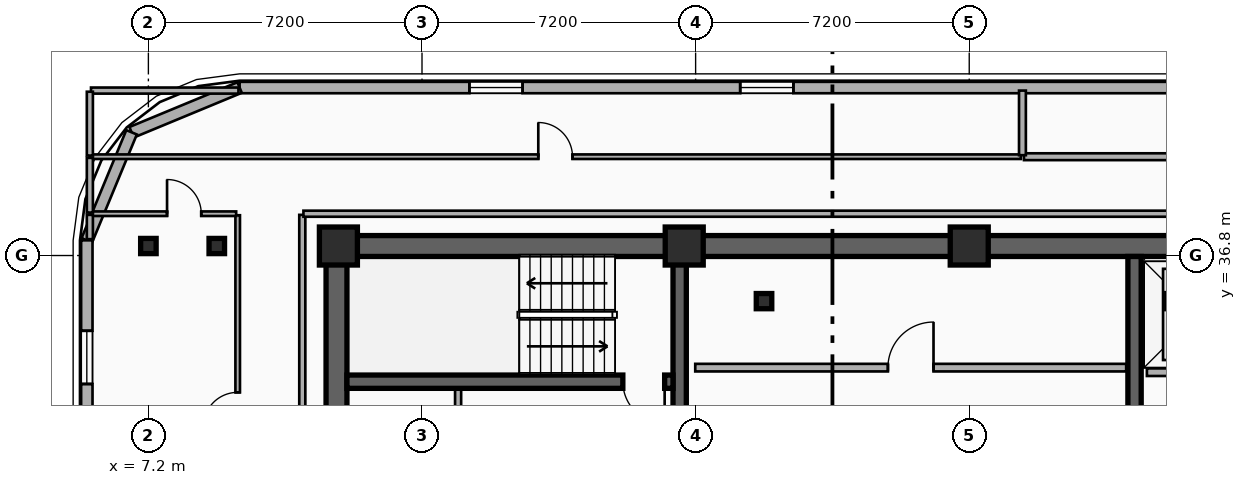
"""IFC4 building model, lengths in metres.
Left out: names, types, materials, properties, quantities, classifications, styles, units other than length and angle.
Written with IfcOpenShell. Run it as: python <this file> out.ifc"""

import sys

from ifc_helpers import new_model, si_unit, direction, frame, frame_2d, origin, origin_2d, place, context, subcontext, project, spatial, rectangle, i_section, extrude, element, fill, save


model = new_model("IFC4")
c1 = context("Model", 3, precision=1e-05, world=origin(), true_north=direction((0.0, 1.0)))
c2 = subcontext(c1, "Body", "Model", "MODEL_VIEW")
j1 = project(units=[si_unit("LENGTHUNIT", "METRE"), si_unit("PLANEANGLEUNIT", "RADIAN")], contexts=[c1])
p1 = place(None, origin())
s1 = spatial("IfcSite", under=j1, at=p1, CompositionType="ELEMENT")
p2 = place(p1, origin())
s2 = spatial("IfcBuilding", under=s1, at=p2, CompositionType="ELEMENT")
p3 = place(p2, frame((0.0, 0.0, 193.2)))
s3 = spatial("IfcBuildingStorey", under=s2, at=p3, CompositionType="ELEMENT", Elevation=193.2)
p4 = place(p3, frame((12.15, 37.05, 0.0), z_axis=(0.0, 0.0, 1.0), x_axis=(1.0, 0.0, 0.0)))
e1 = element("IfcWall", 1, at=p4, inside=s3, PredefinedType="SHEAR", context=c2, shape_type="SweptSolid", body=[
    extrude(rectangle(XDim=33.23, YDim=0.55, at=frame_2d((16.615, 0.0))), origin(), (0.0, 0.0, 1.0), 3.6),
])
p5 = place(p3, frame((12.15, 28.095, 0.0), z_axis=(0.0, 0.0, 1.0), x_axis=(0.0, 1.0, 0.0)))
e2 = element("IfcWall", 2, at=p5, inside=s3, PredefinedType="SHEAR", context=c2, shape_type="SweptSolid", body=[
    extrude(rectangle(XDim=8.68, YDim=0.55, at=frame_2d((4.34, 0.0))), origin(), (0.0, 0.0, 1.0), 3.6),
])
for number, where, z_axis, x_axis in (
    (3, (21.18, 28.095, 0.0), (0.0, 0.0, 1.0), (0.0, 1.0, 0.0)),
    (4, (33.15, 28.095, 0.0), (0.0, 0.0, 1.0), (0.0, 1.0, 0.0)),
):
    element("IfcWall", number, at=place(p3, frame(where, z_axis=z_axis, x_axis=x_axis)), inside=s3, PredefinedType="SHEAR", context=c2, shape_type="SweptSolid", body=[
        extrude(rectangle(XDim=8.68, YDim=0.35, at=frame_2d((4.34, 0.0))), origin(), (0.0, 0.0, 1.0), 3.6),
    ])
p6 = place(p3, frame((21.005, 33.48, 0.0), z_axis=(0.0, 0.0, 1.0), x_axis=(-1.0, 0.0, 0.0)))
e5 = element("IfcWall", 5, at=p6, inside=s3, PredefinedType="SHEAR", context=c2, shape_type="SweptSolid", body=[
    extrude(rectangle(XDim=8.58, YDim=0.35, at=frame_2d((4.29, 0.0))), origin(), (0.0, 0.0, 1.0), 3.6),
])
p7 = place(p6, frame((0.22, 0.0, 0.0)))
e6 = element("IfcOpeningElement", 6, at=p7, cuts=e5, PredefinedType="OPENING", context=c2, shape_type="SweptSolid", body=[
    extrude(rectangle(XDim=1.1, YDim=2.15, at=frame_2d((0.55, 1.075))), frame((0.0, 0.185, 0.0), z_axis=(0.0, -1.0, 0.0), x_axis=(1.0, 0.0, 0.0)), (0.0, 0.0, 1.0), 0.37),
])
p8 = place(p3, frame((23.4, 35.6, 0.0), z_axis=(0.0, 0.0, 1.0), x_axis=(1.0, 0.0, 0.0)))
e7 = element("IfcColumn", 7, at=p8, inside=s3, PredefinedType="COLUMN", context=c2, shape_type="SweptSolid", body=[
    extrude(i_section(OverallWidth=0.408, OverallDepth=0.4, WebThickness=0.025, FlangeThickness=0.039, FilletRadius=0.015, at=origin_2d()), origin(), (0.0, 0.0, 1.0), 3.6),
])
for number, where, z_axis, x_axis in (
    (8, (12.2, 37.05, 0.0), (0.0, 0.0, 1.0), (1.0, 0.0, 0.0)),
    (9, (21.3, 37.05, 0.0), (0.0, 0.0, 1.0), (1.0, 0.0, 0.0)),
    (10, (28.8, 37.05, 0.0), (0.0, 0.0, 1.0), (1.0, 0.0, 0.0)),
):
    element("IfcColumn", number, at=place(p3, frame(where, z_axis=z_axis, x_axis=x_axis)), inside=s3, PredefinedType="COLUMN", context=c2, shape_type="SweptSolid", body=[
        extrude(rectangle(XDim=1.0, YDim=1.0, at=origin_2d()), origin(), (0.0, 0.0, 1.0), 3.6),
    ])
for number, where, z_axis, x_axis in (
    (11, (9.0, 37.05, 0.0), (0.0, 0.0, 1.0), (1.0, 0.0, 0.0)),
    (12, (7.2, 37.05, 0.0), (0.0, 0.0, 1.0), (1.0, 0.0, 0.0)),
):
    element("IfcColumn", number, at=place(p3, frame(where, z_axis=z_axis, x_axis=x_axis)), inside=s3, PredefinedType="COLUMN", context=c2, shape_type="SweptSolid", body=[
        extrude(i_section(OverallWidth=0.408, OverallDepth=0.4, WebThickness=0.025, FlangeThickness=0.039, FilletRadius=0.015, at=origin_2d()), origin(), (0.0, 0.0, 1.0), 3.6),
    ])
p9 = place(p3, frame((9.6, 41.22, 0.0), z_axis=(0.0, 0.0, 1.0), x_axis=(1.0, 0.0, 0.0)))
e13 = element("IfcWall", 13, at=p9, inside=s3, PredefinedType="SOLIDWALL", context=c2, shape_type="SweptSolid", body=[
    extrude(rectangle(XDim=38.4, YDim=0.3, at=frame_2d((19.2, 0.0))), origin(), (0.0, 0.0, 1.0), 3.34),
])
p10 = place(p9, frame((6.047, 0.0, 0.75)))
e14 = element("IfcOpeningElement", 14, at=p10, cuts=e13, PredefinedType="OPENING", context=c2, shape_type="SweptSolid", body=[
    extrude(rectangle(XDim=1.4, YDim=2.1, at=frame_2d((0.7, 1.05))), frame((0.0, 0.16, 0.0), z_axis=(0.0, -1.0, 0.0), x_axis=(1.0, 0.0, 0.0)), (0.0, 0.0, 1.0), 0.32),
])
p11 = place(p9, frame((13.173, 0.0, 0.75)))
e15 = element("IfcOpeningElement", 15, at=p11, cuts=e13, PredefinedType="OPENING", context=c2, shape_type="SweptSolid", body=[
    extrude(rectangle(XDim=1.4, YDim=2.1, at=frame_2d((0.7, 1.05))), frame((0.0, 0.16, 0.0), z_axis=(0.0, -1.0, 0.0), x_axis=(1.0, 0.0, 0.0)), (0.0, 0.0, 1.0), 0.32),
])
p12 = place(p9, frame((25.693, 0.0, 0.75)))
e16 = element("IfcOpeningElement", 16, at=p12, cuts=e13, PredefinedType="OPENING", context=c2, shape_type="SweptSolid", body=[
    extrude(rectangle(XDim=1.4, YDim=2.1, at=frame_2d((0.7, 1.05))), frame((0.0, 0.16, 0.0), z_axis=(0.0, -1.0, 0.0), x_axis=(1.0, 0.0, 0.0)), (0.0, 0.0, 1.0), 0.32),
])
p13 = place(p9, frame((31.887, 0.0, 0.75)))
e17 = element("IfcOpeningElement", 17, at=p13, cuts=e13, PredefinedType="OPENING", context=c2, shape_type="SweptSolid", body=[
    extrude(rectangle(XDim=1.4, YDim=2.1, at=frame_2d((0.7, 1.05))), frame((0.0, 0.16, 0.0), z_axis=(0.0, -1.0, 0.0), x_axis=(1.0, 0.0, 0.0)), (0.0, 0.0, 1.0), 0.32),
])
p14 = place(p3, frame((6.757, 40.042, 0.0), z_axis=(0.0, 0.0, 1.0), x_axis=(0.923882414032, 0.382676475685, 0.0)))
e18 = element("IfcWall", 18, at=p14, inside=s3, PredefinedType="SOLIDWALL", context=c2, shape_type="SweptSolid", body=[
    extrude(rectangle(XDim=3.077, YDim=0.3, at=frame_2d((1.539, 0.0))), origin(), (0.0, 0.0, 1.0), 3.34),
])
p15 = place(p3, frame((5.58, 37.2, 0.0), z_axis=(0.0, 0.0, 1.0), x_axis=(0.382636798336, 0.92389884758, 0.0)))
e19 = element("IfcWall", 19, at=p15, inside=s3, PredefinedType="SOLIDWALL", context=c2, shape_type="SweptSolid", body=[
    extrude(rectangle(XDim=3.077, YDim=0.3, at=frame_2d((1.538, 0.0))), origin(), (0.0, 0.0, 1.0), 3.34),
])
p16 = place(p3, frame((5.58, 8.6, 0.0), z_axis=(0.0, 0.0, 1.0), x_axis=(0.0, 1.0, 0.0)))
e20 = element("IfcWall", 20, at=p16, inside=s3, PredefinedType="SOLIDWALL", context=c2, shape_type="SweptSolid", body=[
    extrude(rectangle(XDim=28.6, YDim=0.3, at=frame_2d((14.3, 0.0))), origin(), (0.0, 0.0, 1.0), 3.34),
])
p17 = place(p16, frame((21.36, 0.0, 0.34)))
e21 = element("IfcOpeningElement", 21, at=p17, cuts=e20, PredefinedType="OPENING", context=c2, shape_type="SweptSolid", body=[
    extrude(rectangle(XDim=1.4, YDim=2.1, at=frame_2d((0.7, 1.05))), frame((0.0, 0.16, 0.0), z_axis=(0.0, -1.0, 0.0), x_axis=(1.0, 0.0, 0.0)), (0.0, 0.0, 1.0), 0.32),
])
p18 = place(p16, frame((24.82, 0.0, 0.34)))
e22 = element("IfcOpeningElement", 22, at=p18, cuts=e20, PredefinedType="OPENING", context=c2, shape_type="SweptSolid", body=[
    extrude(rectangle(XDim=1.4, YDim=2.1, at=frame_2d((0.7, 1.05))), frame((0.0, 0.16, 0.0), z_axis=(0.0, -1.0, 0.0), x_axis=(1.0, 0.0, 0.0)), (0.0, 0.0, 1.0), 0.32),
])
p19 = place(p16, frame((4.797, 0.0, 0.34)))
e23 = element("IfcOpeningElement", 23, at=p19, cuts=e20, PredefinedType="OPENING", context=c2, shape_type="SweptSolid", body=[
    extrude(rectangle(XDim=1.4, YDim=2.1, at=frame_2d((0.7, 1.05))), frame((0.0, 0.16, 0.0), z_axis=(0.0, -1.0, 0.0), x_axis=(1.0, 0.0, 0.0)), (0.0, 0.0, 1.0), 0.32),
])
p20 = place(p16, frame((10.673, 0.0, 0.34)))
e24 = element("IfcOpeningElement", 24, at=p20, cuts=e20, PredefinedType="OPENING", context=c2, shape_type="SweptSolid", body=[
    extrude(rectangle(XDim=1.4, YDim=2.1, at=frame_2d((0.7, 1.05))), frame((0.0, 0.16, 0.0), z_axis=(0.0, -1.0, 0.0), x_axis=(1.0, 0.0, 0.0)), (0.0, 0.0, 1.0), 0.32),
])
p21 = place(p3, frame((33.475, 33.73, 0.0), z_axis=(0.0, 0.0, 1.0), x_axis=(1.0, 0.0, 0.0)))
e25 = element("IfcWall", 25, at=p21, inside=s3, PredefinedType="PARTITIONING", context=c2, shape_type="SweptSolid", body=[
    extrude(rectangle(XDim=2.725, YDim=0.2, at=frame_2d((1.362, 0.0))), origin(), (0.0, 0.0, 1.0), 2.41),
])
p22 = place(p21, frame((0.812, 0.0, 0.0)))
e26 = element("IfcOpeningElement", 26, at=p22, cuts=e25, PredefinedType="OPENING", context=c2, shape_type="SweptSolid", body=[
    extrude(rectangle(XDim=1.1, YDim=2.15, at=frame_2d((0.55, 1.075))), frame((0.0, 0.11, 0.0), z_axis=(0.0, -1.0, 0.0), x_axis=(1.0, 0.0, 0.0)), (0.0, 0.0, 1.0), 0.22),
])
p23 = place(p3, frame((21.59, 33.85, 0.0), z_axis=(0.0, 0.0, 1.0), x_axis=(1.0, 0.0, 0.0)))
e27 = element("IfcWall", 27, at=p23, inside=s3, PredefinedType="PARTITIONING", context=c2, shape_type="SweptSolid", body=[
    extrude(rectangle(XDim=11.34, YDim=0.2, at=frame_2d((5.67, 0.0))), origin(), (0.0, 0.0, 1.0), 2.41),
])
p24 = place(p23, frame((5.07, 0.0, 0.0)))
e28 = element("IfcOpeningElement", 28, at=p24, cuts=e27, PredefinedType="OPENING", context=c2, shape_type="SweptSolid", body=[
    extrude(rectangle(XDim=1.2, YDim=2.15, at=frame_2d((0.6, 1.075))), frame((0.0, 0.11, 0.0), z_axis=(0.0, -1.0, 0.0), x_axis=(1.0, 0.0, 0.0)), (0.0, 0.0, 1.0), 0.22),
])
p25 = place(p3, frame((9.55, 27.64, 0.0), z_axis=(0.0, 0.0, 1.0), x_axis=(0.0, 1.0, 0.0)))
e29 = element("IfcWall", 29, at=p25, inside=s3, PredefinedType="PARTITIONING", context=c2, shape_type="SweptSolid", body=[
    extrude(rectangle(XDim=10.22, YDim=0.12, at=frame_2d((5.11, 0.0))), origin(), (0.0, 0.0, 1.0), 2.82),
])
p26 = place(p25, frame((4.66, 0.0, 0.0)))
e30 = element("IfcOpeningElement", 30, at=p26, cuts=e29, PredefinedType="OPENING", context=c2, shape_type="SweptSolid", body=[
    extrude(rectangle(XDim=0.9, YDim=2.1, at=frame_2d((0.45, 1.05))), frame((0.0, 0.07, 0.0), z_axis=(0.0, -1.0, 0.0), x_axis=(1.0, 0.0, 0.0)), (0.0, 0.0, 1.0), 0.14),
])
p27 = place(p3, frame((5.66, 37.9, 0.0), z_axis=(0.0, 0.0, 1.0), x_axis=(1.0, 0.0, 0.0)))
e31 = element("IfcWall", 31, at=p27, inside=s3, PredefinedType="PARTITIONING", context=c2, shape_type="SweptSolid", body=[
    extrude(rectangle(XDim=3.85, YDim=0.12, at=frame_2d((1.925, 0.0))), origin(), (0.0, 0.0, 1.0), 3.34),
])
p28 = place(p27, frame((2.031, 0.0, 0.0)))
e32 = element("IfcOpeningElement", 32, at=p28, cuts=e31, PredefinedType="OPENING", context=c2, shape_type="SweptSolid", body=[
    extrude(rectangle(XDim=0.9, YDim=2.1, at=frame_2d((0.45, 1.05))), frame((0.0, 0.07, 0.0), z_axis=(0.0, -1.0, 0.0), x_axis=(1.0, 0.0, 0.0)), (0.0, 0.0, 1.0), 0.14),
])
p29 = place(p3, frame((5.66, 39.4, 0.0), z_axis=(0.0, 0.0, 1.0), x_axis=(1.0, 0.0, 0.0)))
e33 = element("IfcWall", 33, at=p29, inside=s3, PredefinedType="PARTITIONING", context=c2, shape_type="SweptSolid", body=[
    extrude(rectangle(XDim=24.5, YDim=0.12, at=frame_2d((12.25, 0.0))), origin(), (0.0, 0.0, 1.0), 3.34),
])
p30 = place(p29, frame((11.8, 0.0, 0.0)))
e34 = element("IfcOpeningElement", 34, at=p30, cuts=e33, PredefinedType="OPENING", context=c2, shape_type="SweptSolid", body=[
    extrude(rectangle(XDim=0.9, YDim=2.1, at=frame_2d((0.45, 1.05))), frame((0.0, 0.07, 0.0), z_axis=(0.0, -1.0, 0.0), x_axis=(1.0, 0.0, 0.0)), (0.0, 0.0, 1.0), 0.14),
])
p31 = place(p3, frame((30.24, 39.4, 0.0), z_axis=(0.0, 0.0, 1.0), x_axis=(1.0, 0.0, 0.0)))
e35 = element("IfcWall", 35, at=p31, inside=s3, PredefinedType="PLUMBINGWALL", context=c2, shape_type="SweptSolid", body=[
    extrude(rectangle(XDim=21.7, YDim=0.18, at=frame_2d((10.85, 0.0))), origin(), (0.0, 0.0, 1.0), 3.34),
])
p32 = place(p31, frame((10.35, 0.0, 0.0)))
e36 = element("IfcOpeningElement", 36, at=p32, cuts=e35, PredefinedType="OPENING", context=c2, shape_type="SweptSolid", body=[
    extrude(rectangle(XDim=1.0, YDim=2.15, at=frame_2d((0.5, 1.075))), frame((0.0, 0.1, 0.0), z_axis=(0.0, -1.0, 0.0), x_axis=(1.0, 0.0, 0.0)), (0.0, 0.0, 1.0), 0.2),
])
p33 = place(p3, frame((30.2, 39.44, 0.0), z_axis=(0.0, 0.0, 1.0), x_axis=(0.0, 1.0, 0.0)))
e37 = element("IfcWall", 37, at=p33, inside=s3, PredefinedType="PLUMBINGWALL", context=c2, shape_type="SweptSolid", body=[
    extrude(rectangle(XDim=1.7, YDim=0.18, at=frame_2d((0.85, 0.0))), origin(), (0.0, 0.0, 1.0), 3.34),
])
p34 = place(p3, frame((15.35, 30.96, 0.0), z_axis=(0.0, 0.0, 1.0), x_axis=(0.0, 1.0, 0.0)))
e38 = element("IfcWall", 38, at=p34, inside=s3, PredefinedType="PARTITIONING", context=c2, shape_type="SweptSolid", body=[
    extrude(rectangle(XDim=2.31, YDim=0.16, at=frame_2d((1.155, 0.0))), origin(), (0.0, 0.0, 1.0), 3.34),
])
p35 = place(p3, frame((11.25, 27.63, 0.0), z_axis=(0.0, 0.0, 1.0), x_axis=(0.0, 1.0, 0.0)))
e39 = element("IfcWall", 39, at=p35, inside=s3, PredefinedType="PARTITIONING", context=c2, shape_type="SweptSolid", body=[
    extrude(rectangle(XDim=10.24, YDim=0.16, at=frame_2d((5.12, 0.0))), origin(), (0.0, 0.0, 1.0), 2.82),
])
p36 = place(p3, frame((11.28, 37.9, 0.0), z_axis=(0.0, 0.0, 1.0), x_axis=(1.0, 0.0, 0.0)))
e40 = element("IfcWall", 40, at=p36, inside=s3, PredefinedType="PARTITIONING", context=c2, shape_type="SweptSolid", body=[
    extrude(rectangle(XDim=35.04, YDim=0.16, at=frame_2d((17.52, 0.0))), origin(), (0.0, 0.0, 1.0), 3.34),
])
p37 = place(p3, frame((5.66, 37.93, 0.0), z_axis=(0.0, 0.0, 1.0), x_axis=(0.0, 1.0, 0.0)))
e41 = element("IfcWall", 41, at=p37, inside=s3, PredefinedType="PARTITIONING", context=c2, shape_type="SweptSolid", body=[
    extrude(rectangle(XDim=1.44, YDim=0.16, at=frame_2d((0.72, 0.0))), origin(), (0.0, 0.0, 1.0), 3.34),
])
p38 = place(p3, frame((5.66, 37.23, 0.0), z_axis=(0.0, 0.0, 1.0), x_axis=(0.0, 1.0, 0.0)))
e42 = element("IfcWall", 42, at=p38, inside=s3, PredefinedType="PARTITIONING", context=c2, shape_type="SweptSolid", body=[
    extrude(rectangle(XDim=0.64, YDim=0.16, at=frame_2d((0.32, 0.0))), origin(), (0.0, 0.0, 1.0), 3.34),
])
p39 = place(p3, frame((5.69, 41.14, 0.0), z_axis=(0.0, 0.0, 1.0), x_axis=(1.0, 0.0, 0.0)))
e43 = element("IfcWall", 43, at=p39, inside=s3, PredefinedType="PARTITIONING", context=c2, shape_type="SweptSolid", body=[
    extrude(rectangle(XDim=3.88, YDim=0.16, at=frame_2d((1.94, 0.0))), origin(), (0.0, 0.0, 1.0), 3.34),
])
p40 = place(p3, frame((5.66, 39.43, 0.0), z_axis=(0.0, 0.0, 1.0), x_axis=(0.0, 1.0, 0.0)))
e44 = element("IfcWall", 44, at=p40, inside=s3, PredefinedType="PARTITIONING", context=c2, shape_type="SweptSolid", body=[
    extrude(rectangle(XDim=1.68, YDim=0.16, at=frame_2d((0.84, 0.0))), origin(), (0.0, 0.0, 1.0), 3.34),
])
p41 = place(p10, origin())
e45 = element("IfcWindow", 45, at=p41, inside=s3, PartitioningType="SINGLE_PANEL", PredefinedType="WINDOW", context=c2, shape_type="SweptSolid", body=[
    extrude(rectangle(XDim=1.4, YDim=2.1, at=frame_2d((0.7, 1.05))), frame((0.0, 0.03, 0.0), z_axis=(0.0, -1.0, 0.0), x_axis=(1.0, 0.0, 0.0)), (0.0, 0.0, 1.0), 0.06),
])
fill(e14, e45)
p42 = place(p11, origin())
e46 = element("IfcWindow", 46, at=p42, inside=s3, PartitioningType="SINGLE_PANEL", PredefinedType="WINDOW", context=c2, shape_type="SweptSolid", body=[
    extrude(rectangle(XDim=1.4, YDim=2.1, at=frame_2d((0.7, 1.05))), frame((0.0, 0.03, 0.0), z_axis=(0.0, -1.0, 0.0), x_axis=(1.0, 0.0, 0.0)), (0.0, 0.0, 1.0), 0.06),
])
fill(e15, e46)
p43 = place(p18, origin())
e47 = element("IfcWindow", 47, at=p43, inside=s3, PartitioningType="SINGLE_PANEL", PredefinedType="WINDOW", context=c2, shape_type="SweptSolid", body=[
    extrude(rectangle(XDim=1.4, YDim=2.1, at=frame_2d((0.7, 1.05))), frame((0.0, 0.03, 0.0), z_axis=(0.0, -1.0, 0.0), x_axis=(1.0, 0.0, 0.0)), (0.0, 0.0, 1.0), 0.06),
])
fill(e22, e47)
p44 = place(p7, origin())
e48 = element("IfcDoor", 48, at=p44, inside=s3, OperationType="SINGLE_SWING_LEFT", PredefinedType="DOOR", context=c2, shape_type="SweptSolid", body=[
    extrude(rectangle(XDim=1.1, YDim=2.15, at=frame_2d((0.55, 1.075))), frame((0.0, 0.025, 0.0), z_axis=(0.0, -1.0, 0.0), x_axis=(1.0, 0.0, 0.0)), (0.0, 0.0, 1.0), 0.05),
])
fill(e6, e48)
p45 = place(p24, origin())
e49 = element("IfcDoor", 49, at=p45, inside=s3, OperationType="SINGLE_SWING_RIGHT", PredefinedType="DOOR", context=c2, shape_type="SweptSolid", body=[
    extrude(rectangle(XDim=1.2, YDim=2.15, at=frame_2d((0.6, 1.075))), frame((0.0, 0.025, 0.0), z_axis=(0.0, -1.0, 0.0), x_axis=(1.0, 0.0, 0.0)), (0.0, 0.0, 1.0), 0.05),
])
fill(e28, e49)
p46 = place(p26, origin())
e50 = element("IfcDoor", 50, at=p46, inside=s3, OperationType="SINGLE_SWING_LEFT", PredefinedType="DOOR", context=c2, shape_type="SweptSolid", body=[
    extrude(rectangle(XDim=0.9, YDim=2.1, at=frame_2d((0.45, 1.05))), frame((0.0, 0.025, 0.0), z_axis=(0.0, -1.0, 0.0), x_axis=(1.0, 0.0, 0.0)), (0.0, 0.0, 1.0), 0.05),
])
fill(e30, e50)
p47 = place(p28, origin())
e51 = element("IfcDoor", 51, at=p47, inside=s3, OperationType="SINGLE_SWING_LEFT", PredefinedType="DOOR", context=c2, shape_type="SweptSolid", body=[
    extrude(rectangle(XDim=0.9, YDim=2.1, at=frame_2d((0.45, 1.05))), frame((0.0, 0.025, 0.0), z_axis=(0.0, -1.0, 0.0), x_axis=(1.0, 0.0, 0.0)), (0.0, 0.0, 1.0), 0.05),
])
fill(e32, e51)
p48 = place(p30, origin())
e52 = element("IfcDoor", 52, at=p48, inside=s3, OperationType="SINGLE_SWING_LEFT", PredefinedType="DOOR", context=c2, shape_type="SweptSolid", body=[
    extrude(rectangle(XDim=0.9, YDim=2.1, at=frame_2d((0.45, 1.05))), frame((0.0, 0.025, 0.0), z_axis=(0.0, -1.0, 0.0), x_axis=(1.0, 0.0, 0.0)), (0.0, 0.0, 1.0), 0.05),
])
fill(e34, e52)
save(model, sys.argv[1])
